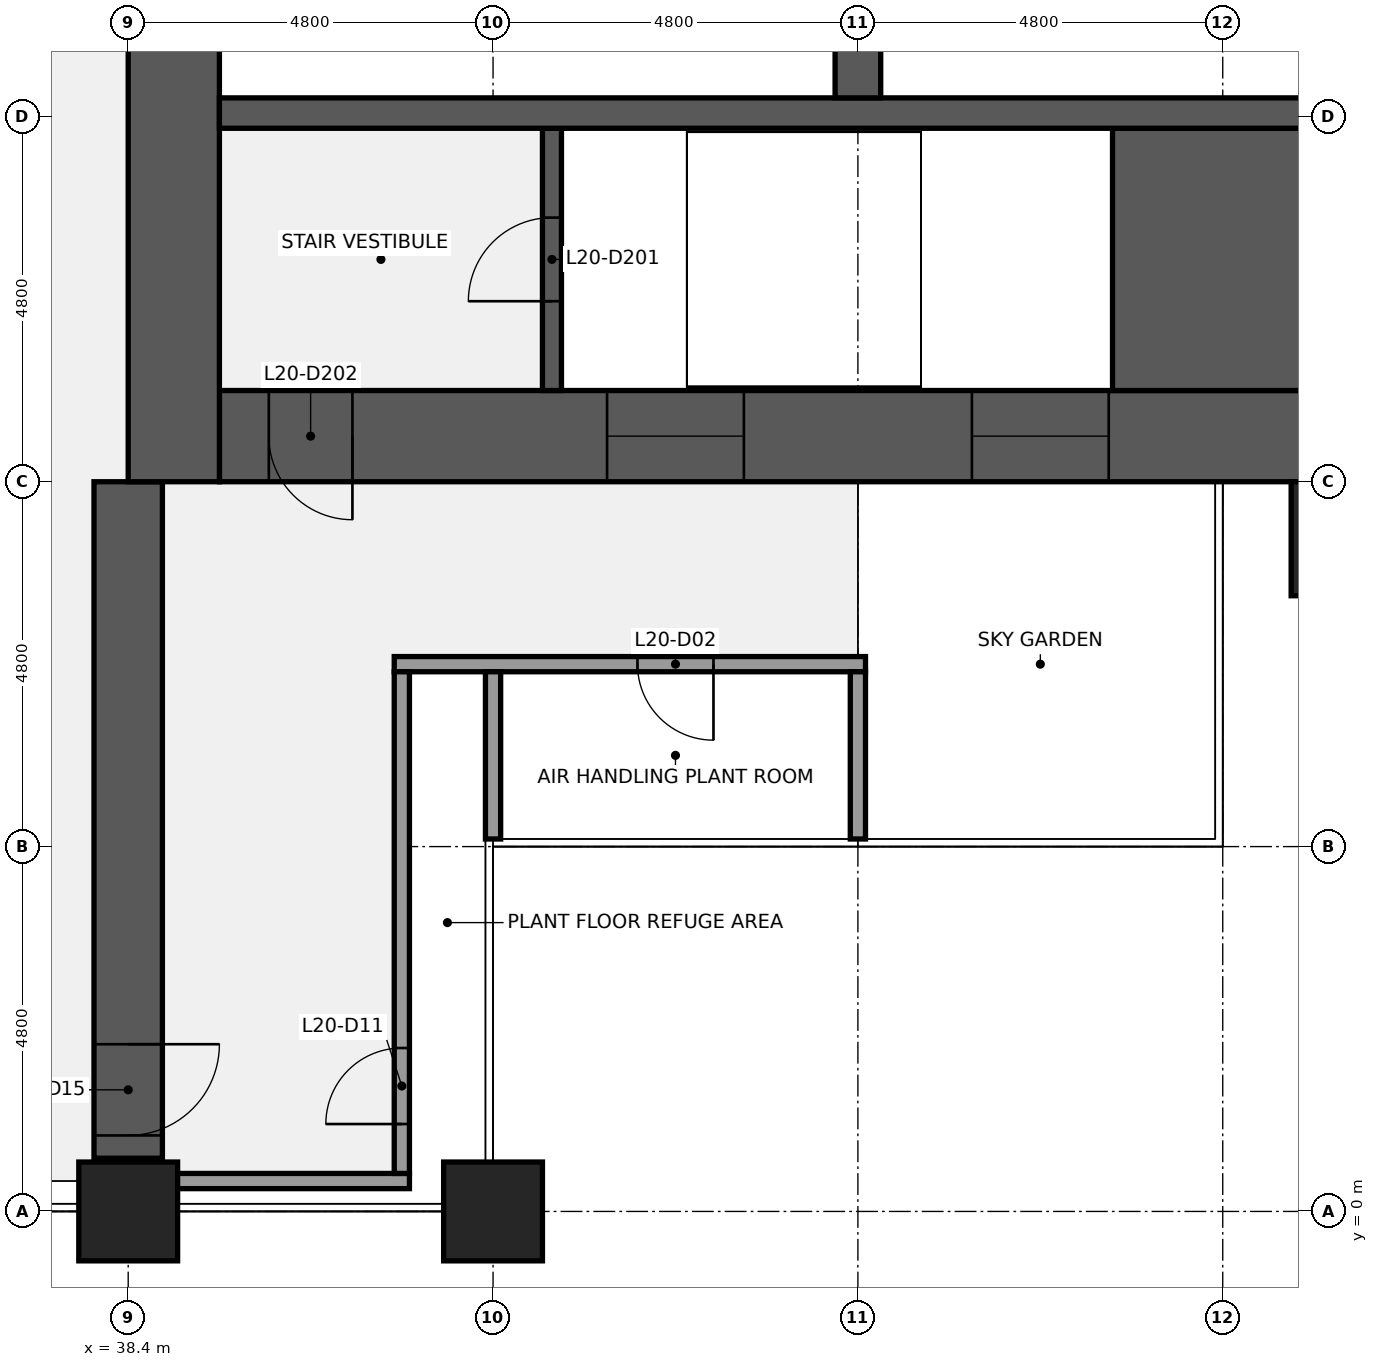
"""IFC4 building model, lengths in metres.
Left out: names, types, materials, properties, quantities, classifications, styles, units other than length and angle.
Written with IfcOpenShell. Run it as: python <this file> out.ifc"""

import sys

from ifc_helpers import new_model, si_unit, direction, frame, frame_2d, origin, origin_2d, place, context, subcontext, project, spatial, rectangle, extrude, element, fill, save


model = new_model("IFC4")
c1 = context("Model", 3, precision=1e-05, world=origin(), true_north=direction((0.0, 1.0)))
c2 = subcontext(c1, "Body", "Model", "MODEL_VIEW")
j1 = project(units=[si_unit("LENGTHUNIT", "METRE"), si_unit("PLANEANGLEUNIT", "RADIAN")], contexts=[c1])
p1 = place(None, origin())
s1 = spatial("IfcSite", under=j1, at=p1, CompositionType="ELEMENT")
p2 = place(p1, origin())
s2 = spatial("IfcBuilding", under=s1, at=p2, CompositionType="ELEMENT")
p3 = place(p2, frame((0.0, 0.0, 91.5)))
s3 = spatial("IfcBuildingStorey", under=s2, at=p3, CompositionType="ELEMENT", Elevation=91.5)
for number, where, z_axis, x_axis in (
    (1, (38.4, 0.0, 0.0), (0.0, 0.0, 1.0), (1.0, 0.0, 0.0)),
    (2, (43.2, 0.0, 0.0), (0.0, 0.0, 1.0), (1.0, 0.0, 0.0)),
):
    element("IfcColumn", number, at=place(p3, frame(where, z_axis=z_axis, x_axis=x_axis)), inside=s3, PredefinedType="COLUMN", context=c2, shape_type="SweptSolid", body=[
        extrude(rectangle(XDim=1.3, YDim=1.3, at=origin_2d()), origin(), (0.0, 0.0, 1.0), 12.6),
    ])
p4 = place(p3, frame((38.4, 0.7, 0.0), z_axis=(0.0, 0.0, 1.0), x_axis=(0.0, 1.0, 0.0)))
e3 = element("IfcWall", 3, at=p4, inside=s3, PredefinedType="SHEAR", context=c2, shape_type="SweptSolid", body=[
    extrude(rectangle(XDim=8.9, YDim=0.9, at=frame_2d((4.45, 0.0))), origin(), (0.0, 0.0, 1.0), 12.3),
])
p5 = place(p4, frame((0.3, 0.0, 0.0)))
e4 = element("IfcOpeningElement", 4, at=p5, cuts=e3, PredefinedType="OPENING", context=c2, shape_type="SweptSolid", body=[
    extrude(rectangle(XDim=1.2, YDim=2.1, at=frame_2d((0.6, 1.05))), frame((0.0, 0.46, 0.0), z_axis=(0.0, -1.0, 0.0), x_axis=(1.0, 0.0, 0.0)), (0.0, 0.0, 1.0), 0.92),
])
p6 = place(p3, frame((56.4, 10.2, 0.0), z_axis=(0.0, 0.0, 1.0), x_axis=(-1.0, 0.0, 0.0)))
e5 = element("IfcWall", 5, at=p6, inside=s3, PredefinedType="SHEAR", context=c2, shape_type="SweptSolid", body=[
    extrude(rectangle(XDim=16.8, YDim=1.2, at=frame_2d((8.4, 0.0))), origin(), (0.0, 0.0, 1.0), 12.3),
])
p7 = place(p6, frame((15.05, 0.0, 0.0)))
e6 = element("IfcOpeningElement", 6, at=p7, cuts=e5, PredefinedType="OPENING", context=c2, shape_type="SweptSolid", body=[
    extrude(rectangle(XDim=1.1, YDim=2.1, at=frame_2d((0.55, 1.05))), frame((0.0, 0.61, 0.0), z_axis=(0.0, -1.0, 0.0), x_axis=(1.0, 0.0, 0.0)), (0.0, 0.0, 1.0), 1.22),
])
p8 = place(p6, frame((5.1, 0.0, 0.9)))
e7 = element("IfcOpeningElement", 7, at=p8, cuts=e5, PredefinedType="OPENING", context=c2, shape_type="SweptSolid", body=[
    extrude(rectangle(XDim=1.8, YDim=1.5, at=frame_2d((0.9, 0.75))), frame((0.0, 0.61, 0.0), z_axis=(0.0, -1.0, 0.0), x_axis=(1.0, 0.0, 0.0)), (0.0, 0.0, 1.0), 1.22),
])
p9 = place(p6, frame((9.9, 0.0, 0.9)))
e8 = element("IfcOpeningElement", 8, at=p9, cuts=e5, PredefinedType="OPENING", context=c2, shape_type="SweptSolid", body=[
    extrude(rectangle(XDim=1.8, YDim=1.5, at=frame_2d((0.9, 0.75))), frame((0.0, 0.61, 0.0), z_axis=(0.0, -1.0, 0.0), x_axis=(1.0, 0.0, 0.0)), (0.0, 0.0, 1.0), 1.22),
])
p10 = place(p3, frame((39.0, 9.6, 0.0), z_axis=(0.0, 0.0, 1.0), x_axis=(0.0, 1.0, 0.0)))
e9 = element("IfcWall", 9, at=p10, inside=s3, PredefinedType="SHEAR", context=c2, shape_type="SweptSolid", body=[
    extrude(rectangle(XDim=28.8, YDim=1.2, at=frame_2d((14.4, 0.0))), origin(), (0.0, 0.0, 1.0), 12.3),
])
p11 = place(p10, frame((8.7, 0.0, 0.0)))
e10 = element("IfcOpeningElement", 10, at=p11, cuts=e9, PredefinedType="OPENING", context=c2, shape_type="SweptSolid", body=[
    extrude(rectangle(XDim=1.8, YDim=2.1, at=frame_2d((0.9, 1.05))), frame((0.0, 0.61, 0.0), z_axis=(0.0, -1.0, 0.0), x_axis=(1.0, 0.0, 0.0)), (0.0, 0.0, 1.0), 1.22),
])
p12 = place(p10, frame((18.3, 0.0, 0.0)))
e11 = element("IfcOpeningElement", 11, at=p12, cuts=e9, PredefinedType="OPENING", context=c2, shape_type="SweptSolid", body=[
    extrude(rectangle(XDim=1.8, YDim=2.1, at=frame_2d((0.9, 1.05))), frame((0.0, 0.61, 0.0), z_axis=(0.0, -1.0, 0.0), x_axis=(1.0, 0.0, 0.0)), (0.0, 0.0, 1.0), 1.22),
])
p13 = place(p3, frame((51.35, 12.525, 0.0), z_axis=(0.0, 0.0, 1.0), x_axis=(1.0, 0.0, 0.0)))
e12 = element("IfcWall", 12, at=p13, inside=s3, PredefinedType="SHEAR", context=c2, shape_type="SweptSolid", body=[
    extrude(rectangle(XDim=5.05, YDim=3.45, at=frame_2d((2.525, 0.0))), origin(), (0.0, 0.0, 1.0), 12.3),
])
p14 = place(p3, frame((43.975, 10.8, 0.0), z_axis=(0.0, 0.0, 1.0), x_axis=(0.0, 1.0, 0.0)))
e13 = element("IfcWall", 13, at=p14, inside=s3, PredefinedType="SHEAR", context=c2, shape_type="SweptSolid", body=[
    extrude(rectangle(XDim=3.45, YDim=0.25, at=frame_2d((1.725, 0.0))), origin(), (0.0, 0.0, 1.0), 12.3),
])
p15 = place(p14, frame((1.175, 0.0, 0.0)))
e14 = element("IfcOpeningElement", 14, at=p15, cuts=e13, PredefinedType="OPENING", context=c2, shape_type="SweptSolid", body=[
    extrude(rectangle(XDim=1.1, YDim=2.1, at=frame_2d((0.55, 1.05))), frame((0.0, 0.135, 0.0), z_axis=(0.0, -1.0, 0.0), x_axis=(1.0, 0.0, 0.0)), (0.0, 0.0, 1.0), 0.27),
])
p16 = place(p3, frame((39.6, 14.45, 0.0), z_axis=(0.0, 0.0, 1.0), x_axis=(1.0, 0.0, 0.0)))
e15 = element("IfcWall", 15, at=p16, inside=s3, PredefinedType="SHEAR", context=c2, shape_type="SweptSolid", body=[
    extrude(rectangle(XDim=16.8, YDim=0.4, at=frame_2d((8.4, 0.0))), origin(), (0.0, 0.0, 1.0), 12.3),
])
p17 = place(p3, frame((48.0, 14.65, 0.0), z_axis=(0.0, 0.0, 1.0), x_axis=(0.0, 1.0, 0.0)))
e16 = element("IfcWall", 16, at=p17, inside=s3, PredefinedType="SHEAR", context=c2, shape_type="SweptSolid", body=[
    extrude(rectangle(XDim=2.6, YDim=0.6, at=frame_2d((1.3, 0.0))), origin(), (0.0, 0.0, 1.0), 12.3),
])
p18 = place(p3, frame((38.3, 0.4, 0.0), z_axis=(0.0, 0.0, 1.0), x_axis=(1.0, 0.0, 0.0)))
e17 = element("IfcWall", 17, at=p18, inside=s3, PredefinedType="PARTITIONING", context=c2, shape_type="SweptSolid", body=[
    extrude(rectangle(XDim=3.8, YDim=0.2, at=frame_2d((1.9, 0.0))), origin(), (0.0, 0.0, 1.0), 11.309),
])
p19 = place(p3, frame((41.9, 7.2, 0.0), z_axis=(0.0, 0.0, 1.0), x_axis=(1.0, 0.0, 0.0)))
e18 = element("IfcWall", 18, at=p19, inside=s3, PredefinedType="PARTITIONING", context=c2, shape_type="SweptSolid", body=[
    extrude(rectangle(XDim=6.2, YDim=0.2, at=frame_2d((3.1, 0.0))), origin(), (0.0, 0.0, 1.0), 11.309),
])
p20 = place(p19, frame((3.2, 0.0, 0.0)))
e19 = element("IfcOpeningElement", 19, at=p20, cuts=e18, PredefinedType="OPENING", context=c2, shape_type="SweptSolid", body=[
    extrude(rectangle(XDim=1.0, YDim=2.1, at=frame_2d((0.5, 1.05))), frame((0.0, 0.11, 0.0), z_axis=(0.0, -1.0, 0.0), x_axis=(1.0, 0.0, 0.0)), (0.0, 0.0, 1.0), 0.22),
])
p21 = place(p3, frame((42.0, 0.5, 0.0), z_axis=(0.0, 0.0, 1.0), x_axis=(0.0, 1.0, 0.0)))
e20 = element("IfcWall", 20, at=p21, inside=s3, PredefinedType="PARTITIONING", context=c2, shape_type="SweptSolid", body=[
    extrude(rectangle(XDim=6.6, YDim=0.2, at=frame_2d((3.3, 0.0))), origin(), (0.0, 0.0, 1.0), 11.309),
])
p22 = place(p21, frame((0.65, 0.0, 0.0)))
e21 = element("IfcOpeningElement", 21, at=p22, cuts=e20, PredefinedType="OPENING", context=c2, shape_type="SweptSolid", body=[
    extrude(rectangle(XDim=1.0, YDim=2.1, at=frame_2d((0.5, 1.05))), frame((0.0, 0.11, 0.0), z_axis=(0.0, -1.0, 0.0), x_axis=(1.0, 0.0, 0.0)), (0.0, 0.0, 1.0), 0.22),
])
for number, where, z_axis, x_axis in (
    (22, (43.2, 4.9, 0.0), (0.0, 0.0, 1.0), (0.0, 1.0, 0.0)),
    (23, (48.0, 4.9, 0.0), (0.0, 0.0, 1.0), (0.0, 1.0, 0.0)),
):
    element("IfcWall", number, at=place(p3, frame(where, z_axis=z_axis, x_axis=x_axis)), inside=s3, PredefinedType="PARTITIONING", context=c2, shape_type="SweptSolid", body=[
        extrude(rectangle(XDim=2.2, YDim=0.2, at=frame_2d((1.1, 0.0))), origin(), (0.0, 0.0, 1.0), 11.309),
    ])
p23 = place(p3, frame((55.2, 8.85, 0.0), z_axis=(0.0, 0.0, 1.0), x_axis=(1.0, 0.0, 0.0)))
e24 = element("IfcColumn", 24, at=p23, inside=s3, PredefinedType="PILASTER", context=c2, shape_type="SweptSolid", body=[
    extrude(rectangle(XDim=3.0, YDim=1.5, at=origin_2d()), origin(), (0.0, 0.0, 1.0), 12.6),
])
for number, where, z_axis, x_axis in (
    (25, (38.4, -1.075, 0.0), (0.0, 0.0, 1.0), (1.0, 0.0, 0.0)),
    (26, (43.2, -1.075, 0.0), (0.0, 0.0, 1.0), (1.0, 0.0, 0.0)),
):
    element("IfcColumn", number, at=place(p3, frame(where, z_axis=z_axis, x_axis=x_axis)), inside=s3, PredefinedType="PILASTER", context=c2, shape_type="SweptSolid", body=[
        extrude(rectangle(XDim=4.2, YDim=0.85, at=origin_2d()), origin(), (0.0, 0.0, 1.0), 12.6),
    ])
p24 = place(p15, origin())
e27 = element("IfcDoor", 27, at=p24, inside=s3, OperationType="SINGLE_SWING_LEFT", PredefinedType="DOOR", context=c2, shape_type="SweptSolid", body=[
    extrude(rectangle(XDim=1.1, YDim=2.1, at=frame_2d((0.55, 1.05))), frame((0.0, 0.025, 0.0), z_axis=(0.0, -1.0, 0.0), x_axis=(1.0, 0.0, 0.0)), (0.0, 0.0, 1.0), 0.05),
])
fill(e14, e27)
p25 = place(p7, origin())
e28 = element("IfcDoor", 28, at=p25, inside=s3, OperationType="SINGLE_SWING_LEFT", PredefinedType="DOOR", context=c2, shape_type="SweptSolid", body=[
    extrude(rectangle(XDim=1.1, YDim=2.1, at=frame_2d((0.55, 1.05))), frame((0.0, 0.025, 0.0), z_axis=(0.0, -1.0, 0.0), x_axis=(1.0, 0.0, 0.0)), (0.0, 0.0, 1.0), 0.05),
])
fill(e6, e28)
p26 = place(p8, origin())
e29 = element("IfcWindow", 29, at=p26, inside=s3, PartitioningType="SINGLE_PANEL", PredefinedType="WINDOW", context=c2, shape_type="SweptSolid", body=[
    extrude(rectangle(XDim=1.8, YDim=1.5, at=frame_2d((0.9, 0.75))), frame((0.0, 0.03, 0.0), z_axis=(0.0, -1.0, 0.0), x_axis=(1.0, 0.0, 0.0)), (0.0, 0.0, 1.0), 0.06),
])
fill(e7, e29)
p27 = place(p9, origin())
e30 = element("IfcWindow", 30, at=p27, inside=s3, PartitioningType="SINGLE_PANEL", PredefinedType="WINDOW", context=c2, shape_type="SweptSolid", body=[
    extrude(rectangle(XDim=1.8, YDim=1.5, at=frame_2d((0.9, 0.75))), frame((0.0, 0.03, 0.0), z_axis=(0.0, -1.0, 0.0), x_axis=(1.0, 0.0, 0.0)), (0.0, 0.0, 1.0), 0.06),
])
fill(e8, e30)
p28 = place(p20, origin())
e31 = element("IfcDoor", 31, at=p28, inside=s3, OperationType="SINGLE_SWING_RIGHT", PredefinedType="DOOR", context=c2, shape_type="SweptSolid", body=[
    extrude(rectangle(XDim=1.0, YDim=2.1, at=frame_2d((0.5, 1.05))), frame((0.0, 0.025, 0.0), z_axis=(0.0, -1.0, 0.0), x_axis=(1.0, 0.0, 0.0)), (0.0, 0.0, 1.0), 0.05),
])
fill(e19, e31)
p29 = place(p22, origin())
e32 = element("IfcDoor", 32, at=p29, inside=s3, OperationType="SINGLE_SWING_LEFT", PredefinedType="DOOR", context=c2, shape_type="SweptSolid", body=[
    extrude(rectangle(XDim=1.0, YDim=2.1, at=frame_2d((0.5, 1.05))), frame((0.0, 0.025, 0.0), z_axis=(0.0, -1.0, 0.0), x_axis=(1.0, 0.0, 0.0)), (0.0, 0.0, 1.0), 0.05),
])
fill(e21, e32)
p30 = place(p5, origin())
e33 = element("IfcDoor", 33, at=p30, inside=s3, OperationType="SINGLE_SWING_RIGHT", PredefinedType="DOOR", context=c2, shape_type="SweptSolid", body=[
    extrude(rectangle(XDim=1.2, YDim=2.1, at=frame_2d((0.6, 1.05))), frame((0.0, 0.025, 0.0), z_axis=(0.0, -1.0, 0.0), x_axis=(1.0, 0.0, 0.0)), (0.0, 0.0, 1.0), 0.05),
])
fill(e4, e33)
save(model, sys.argv[1])
